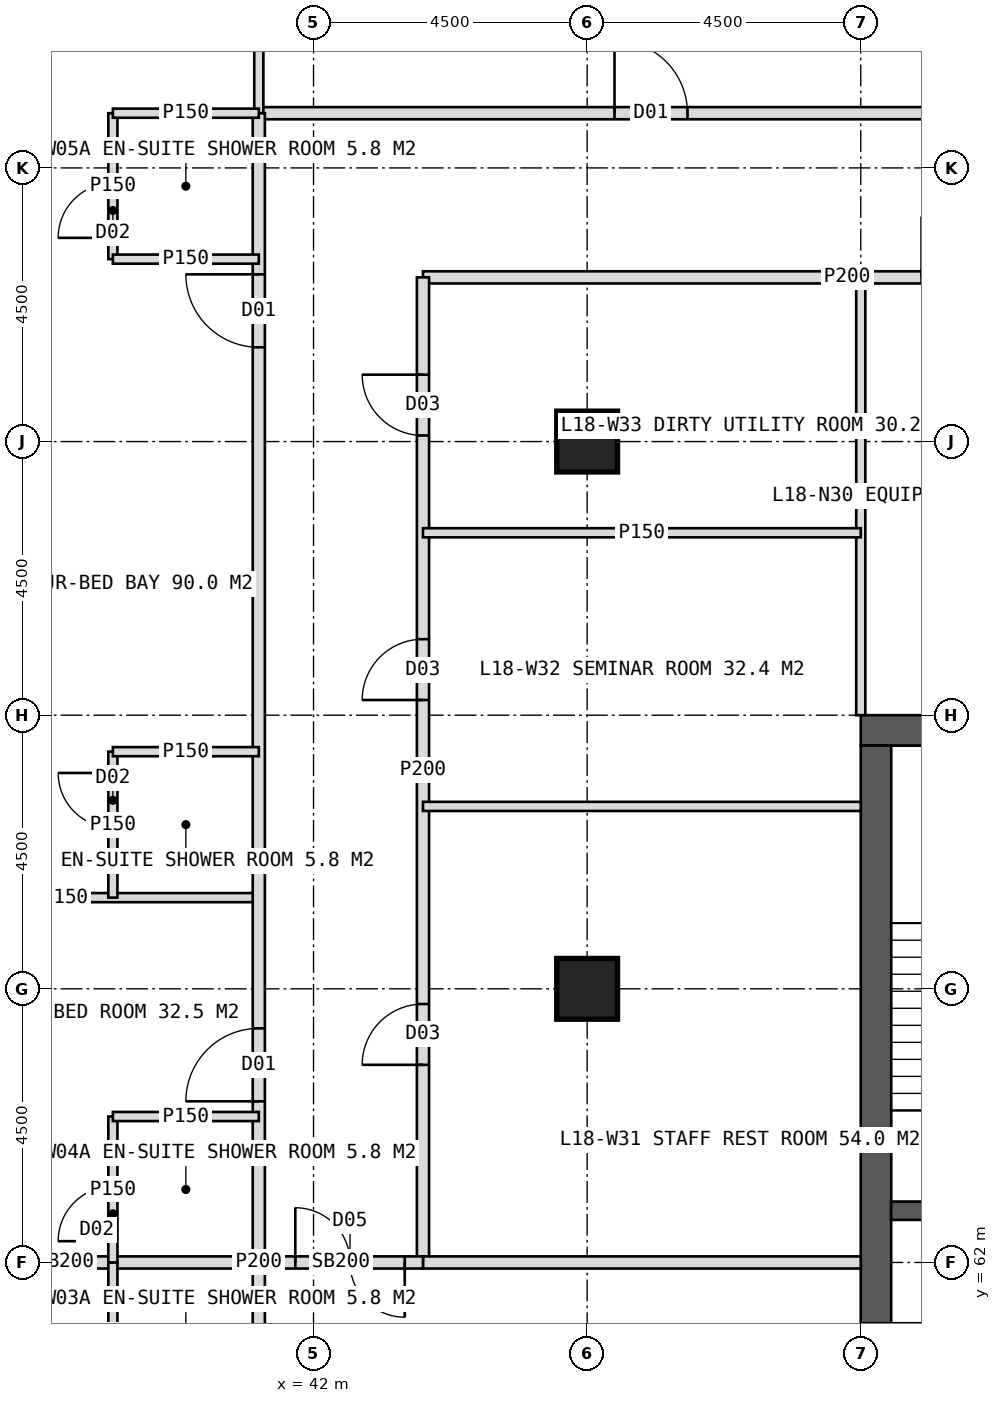
"""IFC4 building model, lengths in metres.
Left out: names, types, materials, properties, quantities, classifications, styles, units other than length and angle.
Written with IfcOpenShell. Run it as: python <this file> out.ifc"""

import sys

from ifc_helpers import new_model, si_unit, direction, frame, frame_2d, origin, origin_2d, place, context, subcontext, project, spatial, rectangle, hollow_rectangle, extrude, element, fill, save


model = new_model("IFC4")
c1 = context("Model", 3, precision=1e-05, world=origin(), true_north=direction((0.0, 1.0)))
c2 = subcontext(c1, "Body", "Model", "MODEL_VIEW")
j1 = project(units=[si_unit("LENGTHUNIT", "METRE"), si_unit("PLANEANGLEUNIT", "RADIAN")], contexts=[c1])
p1 = place(None, origin())
s1 = spatial("IfcSite", under=j1, at=p1, CompositionType="ELEMENT")
p2 = place(p1, origin())
s2 = spatial("IfcBuilding", under=s1, at=p2, CompositionType="ELEMENT")
p3 = place(p2, frame((0.0, 0.0, 79.0)))
s3 = spatial("IfcBuildingStorey", under=s2, at=p3, CompositionType="ELEMENT", Elevation=79.0)
p4 = place(p3, frame((51.0, 70.75, 0.0), z_axis=(0.0, 0.0, 1.0), x_axis=(1.0, 0.0, 0.0)))
e1 = element("IfcWall", 1, at=p4, inside=s3, PredefinedType="SHEAR", context=c2, shape_type="SweptSolid", body=[
    extrude(rectangle(XDim=18.0, YDim=0.5, at=frame_2d((9.0, 0.0))), origin(), (0.0, 0.0, 1.0), 4.0),
])
p5 = place(p4, frame((8.1, 0.0, 0.0)))
e2 = element("IfcOpeningElement", 2, at=p5, cuts=e1, PredefinedType="OPENING", context=c2, shape_type="SweptSolid", body=[
    extrude(rectangle(XDim=1.8, YDim=2.2, at=frame_2d((0.9, 1.1))), frame((0.0, 0.26, 0.0), z_axis=(0.0, -1.0, 0.0), x_axis=(1.0, 0.0, 0.0)), (0.0, 0.0, 1.0), 0.52),
])
p6 = place(p3, frame((51.25, 53.5, 0.0), z_axis=(0.0, 0.0, 1.0), x_axis=(0.0, 1.0, 0.0)))
e3 = element("IfcWall", 3, at=p6, inside=s3, PredefinedType="SHEAR", context=c2, shape_type="SweptSolid", body=[
    extrude(rectangle(XDim=17.0, YDim=0.5, at=frame_2d((8.5, 0.0))), origin(), (0.0, 0.0, 1.0), 4.0),
])
p7 = place(p6, frame((6.0, 0.0, 0.0)))
e4 = element("IfcOpeningElement", 4, at=p7, cuts=e3, PredefinedType="OPENING", context=c2, shape_type="SweptSolid", body=[
    extrude(rectangle(XDim=1.5, YDim=2.2, at=frame_2d((0.75, 1.1))), frame((0.0, 0.26, 0.0), z_axis=(0.0, -1.0, 0.0), x_axis=(1.0, 0.0, 0.0)), (0.0, 0.0, 1.0), 0.52),
])
p8 = place(p3, frame((51.5, 62.85, 0.0), z_axis=(0.0, 0.0, 1.0), x_axis=(1.0, 0.0, 0.0)))
e5 = element("IfcWall", 5, at=p8, inside=s3, PredefinedType="SHEAR", context=c2, shape_type="SweptSolid", body=[
    extrude(rectangle(XDim=3.3, YDim=0.3, at=frame_2d((1.65, 0.0))), origin(), (0.0, 0.0, 1.0), 4.0),
])
p9 = place(p8, frame((1.05, 0.0, 0.0)))
e6 = element("IfcOpeningElement", 6, at=p9, cuts=e5, PredefinedType="OPENING", context=c2, shape_type="SweptSolid", body=[
    extrude(rectangle(XDim=1.2, YDim=2.1, at=frame_2d((0.6, 1.05))), frame((0.0, 0.16, 0.0), z_axis=(0.0, -1.0, 0.0), x_axis=(1.0, 0.0, 0.0)), (0.0, 0.0, 1.0), 0.32),
])
for number, where, z_axis, x_axis in (
    (7, (46.5, 75.5, 0.0), (0.0, 0.0, 1.0), (1.0, 0.0, 0.0)),
    (8, (46.5, 66.5, 0.0), (0.0, 0.0, 1.0), (1.0, 0.0, 0.0)),
):
    element("IfcColumn", number, at=place(p3, frame(where, z_axis=z_axis, x_axis=x_axis)), inside=s3, PredefinedType="COLUMN", context=c2, shape_type="SweptSolid", body=[
        extrude(hollow_rectangle(XDim=1.0, YDim=1.0, WallThickness=0.1, at=origin_2d()), origin(), (0.0, 0.0, 1.0), 4.0),
    ])
p10 = place(p3, frame((41.1, 80.9, 0.0), z_axis=(0.0, 0.0, 1.0), x_axis=(1.0, 0.0, 0.0)))
e9 = element("IfcWall", 9, at=p10, inside=s3, PredefinedType="PARTITIONING", context=c2, shape_type="SweptSolid", body=[
    extrude(rectangle(XDim=37.8, YDim=0.2, at=frame_2d((18.9, 0.0))), origin(), (0.0, 0.0, 1.0), 3.75),
])
p11 = place(p10, frame((5.85, 0.0, 0.0)))
e10 = element("IfcOpeningElement", 10, at=p11, cuts=e9, PredefinedType="OPENING", context=c2, shape_type="SweptSolid", body=[
    extrude(rectangle(XDim=1.2, YDim=2.2, at=frame_2d((0.6, 1.1))), frame((0.0, 0.11, 0.0), z_axis=(0.0, -1.0, 0.0), x_axis=(1.0, 0.0, 0.0)), (0.0, 0.0, 1.0), 0.22),
])
p12 = place(p10, frame((18.3, 0.0, 0.0)))
e11 = element("IfcOpeningElement", 11, at=p12, cuts=e9, PredefinedType="OPENING", context=c2, shape_type="SweptSolid", body=[
    extrude(rectangle(XDim=1.2, YDim=2.2, at=frame_2d((0.6, 1.1))), frame((0.0, 0.11, 0.0), z_axis=(0.0, -1.0, 0.0), x_axis=(1.0, 0.0, 0.0)), (0.0, 0.0, 1.0), 0.22),
])
p13 = place(p10, frame((33.95, 0.0, 0.0)))
e12 = element("IfcOpeningElement", 12, at=p13, cuts=e9, PredefinedType="OPENING", context=c2, shape_type="SweptSolid", body=[
    extrude(rectangle(XDim=1.2, YDim=2.2, at=frame_2d((0.6, 1.1))), frame((0.0, 0.11, 0.0), z_axis=(0.0, -1.0, 0.0), x_axis=(1.0, 0.0, 0.0)), (0.0, 0.0, 1.0), 0.22),
])
p14 = place(p3, frame((41.1, 80.9, 0.0), z_axis=(0.0, 0.0, 1.0), x_axis=(0.0, 1.0, 0.0)))
e13 = element("IfcWall", 13, at=p14, inside=s3, PredefinedType="PARTITIONING", context=c2, shape_type="SweptSolid", body=[
    extrude(rectangle(XDim=6.375, YDim=0.15, at=frame_2d((3.188, 0.0))), origin(), (0.0, 0.0, 1.0), 3.75),
])
p15 = place(p3, frame((51.0, 71.0, 0.0), z_axis=(0.0, 0.0, 1.0), x_axis=(0.0, 1.0, 0.0)))
e14 = element("IfcWall", 14, at=p15, inside=s3, PredefinedType="PARTITIONING", context=c2, shape_type="SweptSolid", body=[
    extrude(rectangle(XDim=7.2, YDim=0.15, at=frame_2d((3.6, 0.0))), origin(), (0.0, 0.0, 1.0), 3.75),
])
p16 = place(p3, frame((43.8, 78.2, 0.0), z_axis=(0.0, 0.0, 1.0), x_axis=(1.0, 0.0, 0.0)))
e15 = element("IfcWall", 15, at=p16, inside=s3, PredefinedType="PARTITIONING", context=c2, shape_type="SweptSolid", body=[
    extrude(rectangle(XDim=13.95, YDim=0.2, at=frame_2d((6.975, 0.0))), origin(), (0.0, 0.0, 1.0), 3.75),
])
p17 = place(p16, frame((8.2, 0.0, 0.0)))
e16 = element("IfcOpeningElement", 16, at=p17, cuts=e15, PredefinedType="OPENING", context=c2, shape_type="SweptSolid", body=[
    extrude(rectangle(XDim=1.0, YDim=2.1, at=frame_2d((0.5, 1.05))), frame((0.0, 0.11, 0.0), z_axis=(0.0, -1.0, 0.0), x_axis=(1.0, 0.0, 0.0)), (0.0, 0.0, 1.0), 0.22),
])
p18 = place(p16, frame((11.575, 0.0, 0.0)))
e17 = element("IfcOpeningElement", 17, at=p18, cuts=e15, PredefinedType="OPENING", context=c2, shape_type="SweptSolid", body=[
    extrude(rectangle(XDim=1.0, YDim=2.1, at=frame_2d((0.5, 1.05))), frame((0.0, 0.11, 0.0), z_axis=(0.0, -1.0, 0.0), x_axis=(1.0, 0.0, 0.0)), (0.0, 0.0, 1.0), 0.22),
])
p19 = place(p3, frame((41.1, 62.0, 0.0), z_axis=(0.0, 0.0, 1.0), x_axis=(-1.0, 0.0, 0.0)))
e18 = element("IfcWall", 18, at=p19, inside=s3, PredefinedType="SOLIDWALL", context=c2, shape_type="SweptSolid", body=[
    extrude(rectangle(XDim=6.375, YDim=0.2, at=frame_2d((3.188, 0.0))), origin(), (0.0, 0.0, 1.0), 2.75),
])
p20 = place(p3, frame((41.1, 68.0, 0.0), z_axis=(0.0, 0.0, 1.0), x_axis=(-1.0, 0.0, 0.0)))
e19 = element("IfcWall", 19, at=p20, inside=s3, PredefinedType="PARTITIONING", context=c2, shape_type="SweptSolid", body=[
    extrude(rectangle(XDim=6.375, YDim=0.15, at=frame_2d((3.188, 0.0))), origin(), (0.0, 0.0, 1.0), 3.75),
])
p21 = place(p3, frame((41.1, 43.1, 0.0), z_axis=(0.0, 0.0, 1.0), x_axis=(0.0, 1.0, 0.0)))
e20 = element("IfcWall", 20, at=p21, inside=s3, PredefinedType="PARTITIONING", context=c2, shape_type="SweptSolid", body=[
    extrude(rectangle(XDim=37.8, YDim=0.2, at=frame_2d((18.9, 0.0))), origin(), (0.0, 0.0, 1.0), 3.75),
])
p22 = place(p21, frame((2.45, 0.0, 0.0)))
e21 = element("IfcOpeningElement", 21, at=p22, cuts=e20, PredefinedType="OPENING", context=c2, shape_type="SweptSolid", body=[
    extrude(rectangle(XDim=1.2, YDim=2.2, at=frame_2d((0.6, 1.1))), frame((0.0, 0.11, 0.0), z_axis=(0.0, -1.0, 0.0), x_axis=(1.0, 0.0, 0.0)), (0.0, 0.0, 1.0), 0.22),
])
p23 = place(p21, frame((9.55, 0.0, 0.0)))
e22 = element("IfcOpeningElement", 22, at=p23, cuts=e20, PredefinedType="OPENING", context=c2, shape_type="SweptSolid", body=[
    extrude(rectangle(XDim=1.2, YDim=2.2, at=frame_2d((0.6, 1.1))), frame((0.0, 0.11, 0.0), z_axis=(0.0, -1.0, 0.0), x_axis=(1.0, 0.0, 0.0)), (0.0, 0.0, 1.0), 0.22),
])
p24 = place(p21, frame((15.05, 0.0, 0.0)))
e23 = element("IfcOpeningElement", 23, at=p24, cuts=e20, PredefinedType="OPENING", context=c2, shape_type="SweptSolid", body=[
    extrude(rectangle(XDim=1.2, YDim=2.2, at=frame_2d((0.6, 1.1))), frame((0.0, 0.11, 0.0), z_axis=(0.0, -1.0, 0.0), x_axis=(1.0, 0.0, 0.0)), (0.0, 0.0, 1.0), 0.22),
])
p25 = place(p21, frame((21.55, 0.0, 0.0)))
e24 = element("IfcOpeningElement", 24, at=p25, cuts=e20, PredefinedType="OPENING", context=c2, shape_type="SweptSolid", body=[
    extrude(rectangle(XDim=1.2, YDim=2.2, at=frame_2d((0.6, 1.1))), frame((0.0, 0.11, 0.0), z_axis=(0.0, -1.0, 0.0), x_axis=(1.0, 0.0, 0.0)), (0.0, 0.0, 1.0), 0.22),
])
p26 = place(p21, frame((33.95, 0.0, 0.0)))
e25 = element("IfcOpeningElement", 25, at=p26, cuts=e20, PredefinedType="OPENING", context=c2, shape_type="SweptSolid", body=[
    extrude(rectangle(XDim=1.2, YDim=2.2, at=frame_2d((0.6, 1.1))), frame((0.0, 0.11, 0.0), z_axis=(0.0, -1.0, 0.0), x_axis=(1.0, 0.0, 0.0)), (0.0, 0.0, 1.0), 0.22),
])
p27 = place(p3, frame((38.7, 59.6, 0.0), z_axis=(0.0, 0.0, 1.0), x_axis=(0.0, 1.0, 0.0)))
e26 = element("IfcWall", 26, at=p27, inside=s3, PredefinedType="PARTITIONING", context=c2, shape_type="SweptSolid", body=[
    extrude(rectangle(XDim=2.4, YDim=0.15, at=frame_2d((1.2, 0.0))), origin(), (0.0, 0.0, 1.0), 3.75),
])
p28 = place(p27, frame((0.35, 0.0, 0.0)))
e27 = element("IfcOpeningElement", 27, at=p28, cuts=e26, PredefinedType="OPENING", context=c2, shape_type="SweptSolid", body=[
    extrude(rectangle(XDim=0.9, YDim=2.1, at=frame_2d((0.45, 1.05))), frame((0.0, 0.085, 0.0), z_axis=(0.0, -1.0, 0.0), x_axis=(1.0, 0.0, 0.0)), (0.0, 0.0, 1.0), 0.17),
])
p29 = place(p3, frame((38.7, 62.0, 0.0), z_axis=(0.0, 0.0, 1.0), x_axis=(0.0, 1.0, 0.0)))
e28 = element("IfcWall", 28, at=p29, inside=s3, PredefinedType="PARTITIONING", context=c2, shape_type="SweptSolid", body=[
    extrude(rectangle(XDim=2.4, YDim=0.15, at=frame_2d((1.2, 0.0))), origin(), (0.0, 0.0, 1.0), 3.75),
])
p30 = place(p29, frame((0.35, 0.0, 0.0)))
e29 = element("IfcOpeningElement", 29, at=p30, cuts=e28, PredefinedType="OPENING", context=c2, shape_type="SweptSolid", body=[
    extrude(rectangle(XDim=0.9, YDim=2.1, at=frame_2d((0.45, 1.05))), frame((0.0, 0.085, 0.0), z_axis=(0.0, -1.0, 0.0), x_axis=(1.0, 0.0, 0.0)), (0.0, 0.0, 1.0), 0.17),
])
p31 = place(p3, frame((41.1, 64.4, 0.0), z_axis=(0.0, 0.0, 1.0), x_axis=(-1.0, 0.0, 0.0)))
e30 = element("IfcWall", 30, at=p31, inside=s3, PredefinedType="PARTITIONING", context=c2, shape_type="SweptSolid", body=[
    extrude(rectangle(XDim=2.4, YDim=0.15, at=frame_2d((1.2, 0.0))), origin(), (0.0, 0.0, 1.0), 3.75),
])
p32 = place(p3, frame((38.7, 78.5, 0.0), z_axis=(0.0, 0.0, 1.0), x_axis=(0.0, 1.0, 0.0)))
e31 = element("IfcWall", 31, at=p32, inside=s3, PredefinedType="PARTITIONING", context=c2, shape_type="SweptSolid", body=[
    extrude(rectangle(XDim=2.4, YDim=0.15, at=frame_2d((1.2, 0.0))), origin(), (0.0, 0.0, 1.0), 3.75),
])
p33 = place(p32, frame((0.35, 0.0, 0.0)))
e32 = element("IfcOpeningElement", 32, at=p33, cuts=e31, PredefinedType="OPENING", context=c2, shape_type="SweptSolid", body=[
    extrude(rectangle(XDim=0.9, YDim=2.1, at=frame_2d((0.45, 1.05))), frame((0.0, 0.085, 0.0), z_axis=(0.0, -1.0, 0.0), x_axis=(1.0, 0.0, 0.0)), (0.0, 0.0, 1.0), 0.17),
])
p34 = place(p3, frame((41.1, 78.5, 0.0), z_axis=(0.0, 0.0, 1.0), x_axis=(-1.0, 0.0, 0.0)))
e33 = element("IfcWall", 33, at=p34, inside=s3, PredefinedType="PARTITIONING", context=c2, shape_type="SweptSolid", body=[
    extrude(rectangle(XDim=2.4, YDim=0.15, at=frame_2d((1.2, 0.0))), origin(), (0.0, 0.0, 1.0), 3.75),
])
p35 = place(p3, frame((38.7, 68.0, 0.0), z_axis=(0.0, 0.0, 1.0), x_axis=(0.0, 1.0, 0.0)))
e34 = element("IfcWall", 34, at=p35, inside=s3, PredefinedType="PARTITIONING", context=c2, shape_type="SweptSolid", body=[
    extrude(rectangle(XDim=2.4, YDim=0.15, at=frame_2d((1.2, 0.0))), origin(), (0.0, 0.0, 1.0), 3.75),
])
p36 = place(p35, frame((1.15, 0.0, 0.0)))
e35 = element("IfcOpeningElement", 35, at=p36, cuts=e34, PredefinedType="OPENING", context=c2, shape_type="SweptSolid", body=[
    extrude(rectangle(XDim=0.9, YDim=2.1, at=frame_2d((0.45, 1.05))), frame((0.0, 0.085, 0.0), z_axis=(0.0, -1.0, 0.0), x_axis=(1.0, 0.0, 0.0)), (0.0, 0.0, 1.0), 0.17),
])
for number, where, z_axis, x_axis in (
    (36, (41.1, 70.4, 0.0), (0.0, 0.0, 1.0), (-1.0, 0.0, 0.0)),
    (37, (41.1, 80.9, 0.0), (0.0, 0.0, 1.0), (-1.0, 0.0, 0.0)),
):
    element("IfcWall", number, at=place(p3, frame(where, z_axis=z_axis, x_axis=x_axis)), inside=s3, PredefinedType="PARTITIONING", context=c2, shape_type="SweptSolid", body=[
        extrude(rectangle(XDim=2.4, YDim=0.15, at=frame_2d((1.2, 0.0))), origin(), (0.0, 0.0, 1.0), 3.75),
    ])
p37 = place(p3, frame((43.8, 62.0, 0.0), z_axis=(0.0, 0.0, 1.0), x_axis=(0.0, 1.0, 0.0)))
e38 = element("IfcWall", 38, at=p37, inside=s3, PredefinedType="PARTITIONING", context=c2, shape_type="SweptSolid", body=[
    extrude(rectangle(XDim=16.2, YDim=0.2, at=frame_2d((8.1, 0.0))), origin(), (0.0, 0.0, 1.0), 3.75),
])
p38 = place(p37, frame((3.25, 0.0, 0.0)))
e39 = element("IfcOpeningElement", 39, at=p38, cuts=e38, PredefinedType="OPENING", context=c2, shape_type="SweptSolid", body=[
    extrude(rectangle(XDim=1.0, YDim=2.1, at=frame_2d((0.5, 1.05))), frame((0.0, 0.11, 0.0), z_axis=(0.0, -1.0, 0.0), x_axis=(1.0, 0.0, 0.0)), (0.0, 0.0, 1.0), 0.22),
])
p39 = place(p37, frame((9.25, 0.0, 0.0)))
e40 = element("IfcOpeningElement", 40, at=p39, cuts=e38, PredefinedType="OPENING", context=c2, shape_type="SweptSolid", body=[
    extrude(rectangle(XDim=1.0, YDim=2.1, at=frame_2d((0.5, 1.05))), frame((0.0, 0.11, 0.0), z_axis=(0.0, -1.0, 0.0), x_axis=(1.0, 0.0, 0.0)), (0.0, 0.0, 1.0), 0.22),
])
p40 = place(p37, frame((13.6, 0.0, 0.0)))
e41 = element("IfcOpeningElement", 41, at=p40, cuts=e38, PredefinedType="OPENING", context=c2, shape_type="SweptSolid", body=[
    extrude(rectangle(XDim=1.0, YDim=2.1, at=frame_2d((0.5, 1.05))), frame((0.0, 0.11, 0.0), z_axis=(0.0, -1.0, 0.0), x_axis=(1.0, 0.0, 0.0)), (0.0, 0.0, 1.0), 0.22),
])
p41 = place(p3, frame((51.0, 62.0, 0.0), z_axis=(0.0, 0.0, 1.0), x_axis=(-1.0, 0.0, 0.0)))
e42 = element("IfcWall", 42, at=p41, inside=s3, PredefinedType="SOLIDWALL", context=c2, shape_type="SweptSolid", body=[
    extrude(rectangle(XDim=7.2, YDim=0.2, at=frame_2d((3.6, 0.0))), origin(), (0.0, 0.0, 1.0), 2.75),
])
for number, where, z_axis, x_axis in (
    (43, (51.0, 69.5, 0.0), (0.0, 0.0, 1.0), (-1.0, 0.0, 0.0)),
    (44, (51.0, 74.0, 0.0), (0.0, 0.0, 1.0), (-1.0, 0.0, 0.0)),
):
    element("IfcWall", number, at=place(p3, frame(where, z_axis=z_axis, x_axis=x_axis)), inside=s3, PredefinedType="PARTITIONING", context=c2, shape_type="SweptSolid", body=[
        extrude(rectangle(XDim=7.2, YDim=0.15, at=frame_2d((3.6, 0.0))), origin(), (0.0, 0.0, 1.0), 3.75),
    ])
p42 = place(p3, frame((43.8, 62.0, 0.0), z_axis=(0.0, 0.0, 1.0), x_axis=(-1.0, 0.0, 0.0)))
e45 = element("IfcWall", 45, at=p42, inside=s3, PredefinedType="SOLIDWALL", context=c2, shape_type="SweptSolid", body=[
    extrude(rectangle(XDim=2.7, YDim=0.2, at=frame_2d((1.35, 0.0))), origin(), (0.0, 0.0, 1.0), 2.75),
])
p43 = place(p42, frame((0.3, 0.0, 0.0)))
e46 = element("IfcOpeningElement", 46, at=p43, cuts=e45, PredefinedType="OPENING", context=c2, shape_type="SweptSolid", body=[
    extrude(rectangle(XDim=1.8, YDim=2.2, at=frame_2d((0.9, 1.1))), frame((0.0, 0.11, 0.0), z_axis=(0.0, -1.0, 0.0), x_axis=(1.0, 0.0, 0.0)), (0.0, 0.0, 1.0), 0.22),
])
p44 = place(p11, origin())
e47 = element("IfcDoor", 47, at=p44, inside=s3, OperationType="SINGLE_SWING_LEFT", PredefinedType="DOOR", context=c2, shape_type="SweptSolid", body=[
    extrude(rectangle(XDim=1.2, YDim=2.2, at=frame_2d((0.6, 1.1))), frame((0.0, 0.025, 0.0), z_axis=(0.0, -1.0, 0.0), x_axis=(1.0, 0.0, 0.0)), (0.0, 0.0, 1.0), 0.05),
])
fill(e10, e47)
p45 = place(p25, origin())
e48 = element("IfcDoor", 48, at=p45, inside=s3, OperationType="SINGLE_SWING_LEFT", PredefinedType="DOOR", context=c2, shape_type="SweptSolid", body=[
    extrude(rectangle(XDim=1.2, YDim=2.2, at=frame_2d((0.6, 1.1))), frame((0.0, 0.025, 0.0), z_axis=(0.0, -1.0, 0.0), x_axis=(1.0, 0.0, 0.0)), (0.0, 0.0, 1.0), 0.05),
])
fill(e24, e48)
p46 = place(p30, origin())
e49 = element("IfcDoor", 49, at=p46, inside=s3, OperationType="SINGLE_SWING_LEFT", PredefinedType="DOOR", context=c2, shape_type="SweptSolid", body=[
    extrude(rectangle(XDim=0.9, YDim=2.1, at=frame_2d((0.45, 1.05))), frame((0.0, 0.025, 0.0), z_axis=(0.0, -1.0, 0.0), x_axis=(1.0, 0.0, 0.0)), (0.0, 0.0, 1.0), 0.05),
])
fill(e29, e49)
p47 = place(p26, origin())
e50 = element("IfcDoor", 50, at=p47, inside=s3, OperationType="SINGLE_SWING_RIGHT", PredefinedType="DOOR", context=c2, shape_type="SweptSolid", body=[
    extrude(rectangle(XDim=1.2, YDim=2.2, at=frame_2d((0.6, 1.1))), frame((0.0, 0.025, 0.0), z_axis=(0.0, -1.0, 0.0), x_axis=(1.0, 0.0, 0.0)), (0.0, 0.0, 1.0), 0.05),
])
fill(e25, e50)
p48 = place(p33, origin())
e51 = element("IfcDoor", 51, at=p48, inside=s3, OperationType="SINGLE_SWING_LEFT", PredefinedType="DOOR", context=c2, shape_type="SweptSolid", body=[
    extrude(rectangle(XDim=0.9, YDim=2.1, at=frame_2d((0.45, 1.05))), frame((0.0, 0.025, 0.0), z_axis=(0.0, -1.0, 0.0), x_axis=(1.0, 0.0, 0.0)), (0.0, 0.0, 1.0), 0.05),
])
fill(e32, e51)
p49 = place(p36, origin())
e52 = element("IfcDoor", 52, at=p49, inside=s3, OperationType="SINGLE_SWING_RIGHT", PredefinedType="DOOR", context=c2, shape_type="SweptSolid", body=[
    extrude(rectangle(XDim=0.9, YDim=2.1, at=frame_2d((0.45, 1.05))), frame((0.0, 0.025, 0.0), z_axis=(0.0, -1.0, 0.0), x_axis=(1.0, 0.0, 0.0)), (0.0, 0.0, 1.0), 0.05),
])
fill(e35, e52)
p50 = place(p38, origin())
e53 = element("IfcDoor", 53, at=p50, inside=s3, OperationType="SINGLE_SWING_LEFT", PredefinedType="DOOR", context=c2, shape_type="SweptSolid", body=[
    extrude(rectangle(XDim=1.0, YDim=2.1, at=frame_2d((0.5, 1.05))), frame((0.0, 0.025, 0.0), z_axis=(0.0, -1.0, 0.0), x_axis=(1.0, 0.0, 0.0)), (0.0, 0.0, 1.0), 0.05),
])
fill(e39, e53)
p51 = place(p39, origin())
e54 = element("IfcDoor", 54, at=p51, inside=s3, OperationType="SINGLE_SWING_LEFT", PredefinedType="DOOR", context=c2, shape_type="SweptSolid", body=[
    extrude(rectangle(XDim=1.0, YDim=2.1, at=frame_2d((0.5, 1.05))), frame((0.0, 0.025, 0.0), z_axis=(0.0, -1.0, 0.0), x_axis=(1.0, 0.0, 0.0)), (0.0, 0.0, 1.0), 0.05),
])
fill(e40, e54)
p52 = place(p40, origin())
e55 = element("IfcDoor", 55, at=p52, inside=s3, OperationType="SINGLE_SWING_RIGHT", PredefinedType="DOOR", context=c2, shape_type="SweptSolid", body=[
    extrude(rectangle(XDim=1.0, YDim=2.1, at=frame_2d((0.5, 1.05))), frame((0.0, 0.025, 0.0), z_axis=(0.0, -1.0, 0.0), x_axis=(1.0, 0.0, 0.0)), (0.0, 0.0, 1.0), 0.05),
])
fill(e41, e55)
p53 = place(p43, origin())
e56 = element("IfcDoor", 56, at=p53, inside=s3, OperationType="DOUBLE_DOOR_DOUBLE_SWING", PredefinedType="DOOR", context=c2, shape_type="SweptSolid", body=[
    extrude(rectangle(XDim=1.8, YDim=2.2, at=frame_2d((0.9, 1.1))), frame((0.0, 0.025, 0.0), z_axis=(0.0, -1.0, 0.0), x_axis=(1.0, 0.0, 0.0)), (0.0, 0.0, 1.0), 0.05),
])
fill(e46, e56)
save(model, sys.argv[1])
